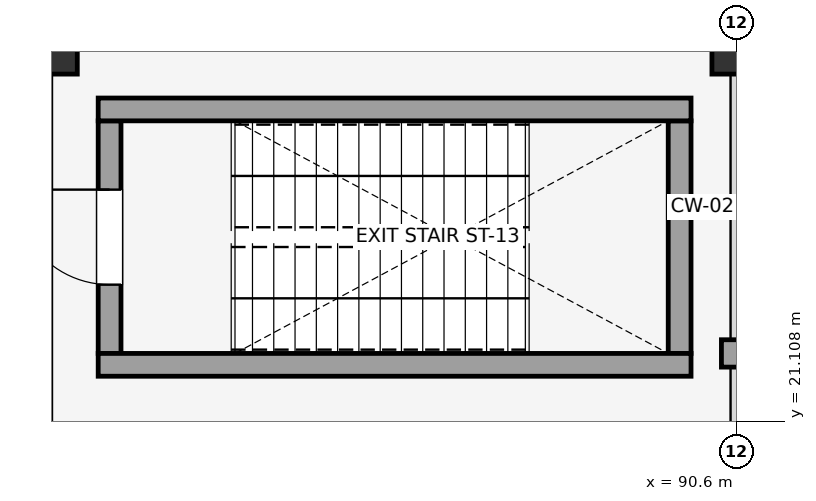
"""IFC4 building model, lengths in metres.
Left out: names, types, materials, properties, quantities, classifications, styles, units other than length and angle.
Written with IfcOpenShell. Run it as: python <this file> out.ifc"""

import sys

from ifc_helpers import new_model, si_unit, direction, frame, frame_2d, origin, origin_2d, place, context, subcontext, project, spatial, rectangle, extrude, element, fill, save


model = new_model("IFC4")
c1 = context("Model", 3, precision=1e-05, world=origin(), true_north=direction((0.0, 1.0)))
c2 = subcontext(c1, "Body", "Model", "MODEL_VIEW")
j1 = project(units=[si_unit("LENGTHUNIT", "METRE"), si_unit("PLANEANGLEUNIT", "RADIAN")], contexts=[c1])
p1 = place(None, origin())
s1 = spatial("IfcSite", under=j1, at=p1, CompositionType="ELEMENT")
p2 = place(p1, origin())
s2 = spatial("IfcBuilding", under=s1, at=p2, CompositionType="ELEMENT")
p3 = place(p2, frame((0.0, 0.0, 4.5)))
s3 = spatial("IfcBuildingStorey", under=s2, at=p3, CompositionType="ELEMENT", Elevation=4.5)
for number, where, z_axis, x_axis in (
    (1, (81.6, 26.0, 0.0), (0.0, 0.0, 1.0), (1.0, 0.0, 0.0)),
    (2, (90.6, 26.0, 0.0), (0.0, 0.0, 1.0), (1.0, 0.0, 0.0)),
):
    element("IfcColumn", number, at=place(p3, frame(where, z_axis=z_axis, x_axis=x_axis)), inside=s3, PredefinedType="COLUMN", context=c2, shape_type="SweptSolid", body=[
        extrude(rectangle(XDim=0.65, YDim=0.65, at=origin_2d()), origin(), (0.0, 0.0, 1.0), 4.5),
    ])
p4 = place(p3, frame((90.6, 21.82, 0.0), z_axis=(0.0, 0.0, 1.0), x_axis=(0.0, 1.0, 0.0)))
e3 = element("IfcWall", 3, at=p4, inside=s3, PredefinedType="SOLIDWALL", context=c2, shape_type="SweptSolid", body=[
    extrude(rectangle(XDim=0.36, YDim=0.4, at=frame_2d((0.18, 0.0))), origin(), (0.0, 0.0, 1.0), 3.12),
])
p5 = place(p3, frame((82.35, 22.0, 0.0), z_axis=(0.0, 0.0, 1.0), x_axis=(0.0, 1.0, 0.0)))
e4 = element("IfcWall", 4, at=p5, inside=s3, PredefinedType="SHEAR", context=c2, shape_type="SweptSolid", body=[
    extrude(rectangle(XDim=3.06, YDim=0.3, at=frame_2d((1.53, 0.0))), origin(), (0.0, 0.0, 1.0), 4.5),
])
p6 = place(p5, frame((0.905, 0.0, 0.0)))
e5 = element("IfcOpeningElement", 5, at=p6, cuts=e4, PredefinedType="OPENING", context=c2, shape_type="SweptSolid", body=[
    extrude(rectangle(XDim=1.25, YDim=2.15, at=frame_2d((0.625, 1.075))), frame((0.0, 0.16, 0.0), z_axis=(0.0, -1.0, 0.0), x_axis=(1.0, 0.0, 0.0)), (0.0, 0.0, 1.0), 0.32),
])
p7 = place(p3, frame((89.85, 22.0, 0.0), z_axis=(0.0, 0.0, 1.0), x_axis=(0.0, 1.0, 0.0)))
e6 = element("IfcWall", 6, at=p7, inside=s3, PredefinedType="SHEAR", context=c2, shape_type="SweptSolid", body=[
    extrude(rectangle(XDim=3.06, YDim=0.3, at=frame_2d((1.53, 0.0))), origin(), (0.0, 0.0, 1.0), 4.5),
])
for number, where, z_axis, x_axis in (
    (7, (82.2, 21.85, 0.0), (0.0, 0.0, 1.0), (1.0, 0.0, 0.0)),
    (8, (82.2, 25.21, 0.0), (0.0, 0.0, 1.0), (1.0, 0.0, 0.0)),
):
    element("IfcWall", number, at=place(p3, frame(where, z_axis=z_axis, x_axis=x_axis)), inside=s3, PredefinedType="SHEAR", context=c2, shape_type="SweptSolid", body=[
        extrude(rectangle(XDim=7.8, YDim=0.3, at=frame_2d((3.9, 0.0))), origin(), (0.0, 0.0, 1.0), 4.5),
    ])
p8 = place(p6, origin())
e9 = element("IfcDoor", 9, at=p8, inside=s3, OperationType="SINGLE_SWING_RIGHT", PredefinedType="DOOR", context=c2, shape_type="SweptSolid", body=[
    extrude(rectangle(XDim=1.25, YDim=2.15, at=frame_2d((0.625, 1.075))), frame((0.0, 0.025, 0.0), z_axis=(0.0, -1.0, 0.0), x_axis=(1.0, 0.0, 0.0)), (0.0, 0.0, 1.0), 0.05),
])
fill(e5, e9)
save(model, sys.argv[1])
